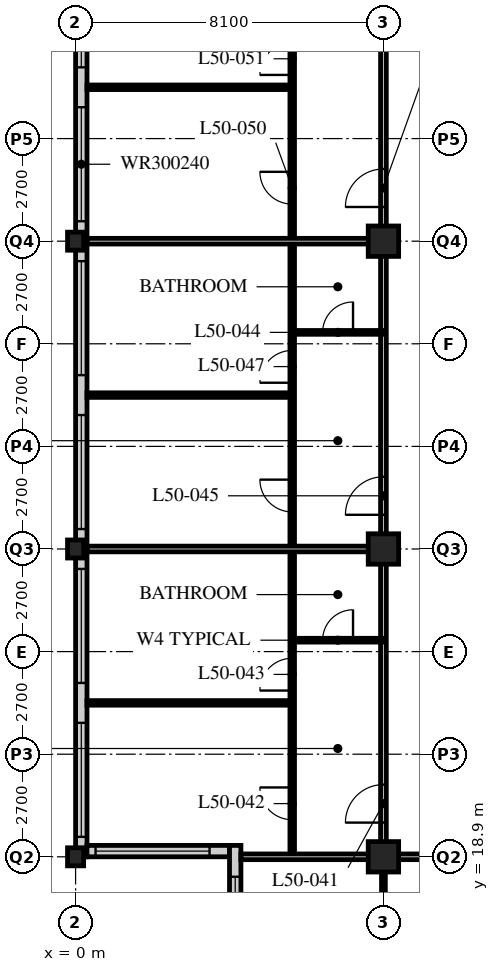
"""IFC4 building model, lengths in metres.
Left out: names, types, materials, properties, quantities, classifications, styles, units other than length and angle.
Written with IfcOpenShell. Run it as: python <this file> out.ifc"""

import sys

from ifc_helpers import new_model, si_unit, direction, frame, frame_2d, origin, origin_2d, place, context, subcontext, project, spatial, rectangle, hollow_rectangle, i_section, extrude, element, fill, save


model = new_model("IFC4")
c1 = context("Model", 3, precision=1e-05, world=origin(), true_north=direction((0.0, 1.0)))
c2 = subcontext(c1, "Body", "Model", "MODEL_VIEW")
j1 = project(units=[si_unit("LENGTHUNIT", "METRE"), si_unit("PLANEANGLEUNIT", "RADIAN")], contexts=[c1])
p1 = place(None, origin())
s1 = spatial("IfcSite", under=j1, at=p1, CompositionType="ELEMENT")
p2 = place(p1, origin())
s2 = spatial("IfcBuilding", under=s1, at=p2, CompositionType="ELEMENT")
p3 = place(p2, frame((0.0, 0.0, 195.6)))
s3 = spatial("IfcBuildingStorey", under=s2, at=p3, CompositionType="ELEMENT", Elevation=195.6)
for number, where, z_axis, x_axis in (
    (1, (0.0, 18.9, 0.0), (0.0, 0.0, 1.0), (1.0, 0.0, 0.0)),
    (2, (0.0, 27.0, 0.0), (0.0, 0.0, 1.0), (1.0, 0.0, 0.0)),
    (3, (0.0, 35.1, 0.0), (0.0, 0.0, 1.0), (1.0, 0.0, 0.0)),
):
    element("IfcColumn", number, at=place(p3, frame(where, z_axis=z_axis, x_axis=x_axis)), inside=s3, PredefinedType="COLUMN", context=c2, shape_type="SweptSolid", body=[
        extrude(i_section(OverallWidth=0.424, OverallDepth=0.475, WebThickness=0.048, FlangeThickness=0.077, FilletRadius=0.015, at=origin_2d()), origin(), (0.0, 0.0, 1.0), 3.6),
    ])
for number, where, z_axis, x_axis in (
    (4, (8.1, 18.9, 0.0), (0.0, 0.0, 1.0), (1.0, 0.0, 0.0)),
    (5, (8.1, 27.0, 0.0), (0.0, 0.0, 1.0), (1.0, 0.0, 0.0)),
    (6, (8.1, 35.1, 0.0), (0.0, 0.0, 1.0), (1.0, 0.0, 0.0)),
):
    element("IfcColumn", number, at=place(p3, frame(where, z_axis=z_axis, x_axis=x_axis)), inside=s3, PredefinedType="COLUMN", context=c2, shape_type="SweptSolid", body=[
        extrude(hollow_rectangle(XDim=0.8, YDim=0.8, WallThickness=0.08, at=origin_2d()), origin(), (0.0, 0.0, 1.0), 3.6),
    ])
p4 = place(p3, frame((0.15, 51.0, 0.0), z_axis=(0.0, 0.0, 1.0), x_axis=(0.0, -1.0, 0.0)))
e7 = element("IfcWall", 7, at=p4, inside=s3, PredefinedType="SOLIDWALL", context=c2, shape_type="SweptSolid", body=[
    extrude(rectangle(XDim=32.1, YDim=0.3, at=frame_2d((16.05, 0.0))), origin(), (0.0, 0.0, 1.0), 3.39),
])
p5 = place(p4, frame((0.225, 0.0, 0.6)))
e8 = element("IfcOpeningElement", 8, at=p5, cuts=e7, PredefinedType="OPENING", context=c2, shape_type="SweptSolid", body=[
    extrude(rectangle(XDim=3.0, YDim=2.4, at=frame_2d((1.5, 1.2))), frame((0.0, 0.16, 0.0), z_axis=(0.0, -1.0, 0.0), x_axis=(1.0, 0.0, 0.0)), (0.0, 0.0, 1.0), 0.32),
])
p6 = place(p4, frame((4.275, 0.0, 0.6)))
e9 = element("IfcOpeningElement", 9, at=p6, cuts=e7, PredefinedType="OPENING", context=c2, shape_type="SweptSolid", body=[
    extrude(rectangle(XDim=3.0, YDim=2.4, at=frame_2d((1.5, 1.2))), frame((0.0, 0.16, 0.0), z_axis=(0.0, -1.0, 0.0), x_axis=(1.0, 0.0, 0.0)), (0.0, 0.0, 1.0), 0.32),
])
p7 = place(p4, frame((8.325, 0.0, 0.6)))
e10 = element("IfcOpeningElement", 10, at=p7, cuts=e7, PredefinedType="OPENING", context=c2, shape_type="SweptSolid", body=[
    extrude(rectangle(XDim=3.0, YDim=2.4, at=frame_2d((1.5, 1.2))), frame((0.0, 0.16, 0.0), z_axis=(0.0, -1.0, 0.0), x_axis=(1.0, 0.0, 0.0)), (0.0, 0.0, 1.0), 0.32),
])
p8 = place(p4, frame((12.375, 0.0, 0.6)))
e11 = element("IfcOpeningElement", 11, at=p8, cuts=e7, PredefinedType="OPENING", context=c2, shape_type="SweptSolid", body=[
    extrude(rectangle(XDim=3.0, YDim=2.4, at=frame_2d((1.5, 1.2))), frame((0.0, 0.16, 0.0), z_axis=(0.0, -1.0, 0.0), x_axis=(1.0, 0.0, 0.0)), (0.0, 0.0, 1.0), 0.32),
])
p9 = place(p4, frame((16.425, 0.0, 0.6)))
e12 = element("IfcOpeningElement", 12, at=p9, cuts=e7, PredefinedType="OPENING", context=c2, shape_type="SweptSolid", body=[
    extrude(rectangle(XDim=3.0, YDim=2.4, at=frame_2d((1.5, 1.2))), frame((0.0, 0.16, 0.0), z_axis=(0.0, -1.0, 0.0), x_axis=(1.0, 0.0, 0.0)), (0.0, 0.0, 1.0), 0.32),
])
p10 = place(p4, frame((20.475, 0.0, 0.6)))
e13 = element("IfcOpeningElement", 13, at=p10, cuts=e7, PredefinedType="OPENING", context=c2, shape_type="SweptSolid", body=[
    extrude(rectangle(XDim=3.0, YDim=2.4, at=frame_2d((1.5, 1.2))), frame((0.0, 0.16, 0.0), z_axis=(0.0, -1.0, 0.0), x_axis=(1.0, 0.0, 0.0)), (0.0, 0.0, 1.0), 0.32),
])
p11 = place(p4, frame((24.525, 0.0, 0.6)))
e14 = element("IfcOpeningElement", 14, at=p11, cuts=e7, PredefinedType="OPENING", context=c2, shape_type="SweptSolid", body=[
    extrude(rectangle(XDim=3.0, YDim=2.4, at=frame_2d((1.5, 1.2))), frame((0.0, 0.16, 0.0), z_axis=(0.0, -1.0, 0.0), x_axis=(1.0, 0.0, 0.0)), (0.0, 0.0, 1.0), 0.32),
])
p12 = place(p4, frame((28.575, 0.0, 0.6)))
e15 = element("IfcOpeningElement", 15, at=p12, cuts=e7, PredefinedType="OPENING", context=c2, shape_type="SweptSolid", body=[
    extrude(rectangle(XDim=3.0, YDim=2.4, at=frame_2d((1.5, 1.2))), frame((0.0, 0.16, 0.0), z_axis=(0.0, -1.0, 0.0), x_axis=(1.0, 0.0, 0.0)), (0.0, 0.0, 1.0), 0.32),
])
p13 = place(p3, frame((0.3, 19.05, 0.0), z_axis=(0.0, 0.0, 1.0), x_axis=(1.0, 0.0, 0.0)))
e16 = element("IfcWall", 16, at=p13, inside=s3, PredefinedType="SOLIDWALL", context=c2, shape_type="SweptSolid", body=[
    extrude(rectangle(XDim=3.75, YDim=0.3, at=frame_2d((1.875, 0.0))), origin(), (0.0, 0.0, 1.0), 3.39),
])
p14 = place(p13, frame((0.225, 0.0, 0.6)))
e17 = element("IfcOpeningElement", 17, at=p14, cuts=e16, PredefinedType="OPENING", context=c2, shape_type="SweptSolid", body=[
    extrude(rectangle(XDim=3.0, YDim=2.0, at=frame_2d((1.5, 1.0))), frame((0.0, 0.16, 0.0), z_axis=(0.0, -1.0, 0.0), x_axis=(1.0, 0.0, 0.0)), (0.0, 0.0, 1.0), 0.32),
])
p15 = place(p3, frame((4.2, 19.2, 0.0), z_axis=(0.0, 0.0, 1.0), x_axis=(0.0, -1.0, 0.0)))
e18 = element("IfcWall", 18, at=p15, inside=s3, PredefinedType="SOLIDWALL", context=c2, shape_type="SweptSolid", body=[
    extrude(rectangle(XDim=4.35, YDim=0.3, at=frame_2d((2.175, 0.0))), origin(), (0.0, 0.0, 1.0), 3.39),
])
p16 = place(p15, frame((0.825, 0.0, 0.6)))
e19 = element("IfcOpeningElement", 19, at=p16, cuts=e18, PredefinedType="OPENING", context=c2, shape_type="SweptSolid", body=[
    extrude(rectangle(XDim=3.0, YDim=2.0, at=frame_2d((1.5, 1.0))), frame((0.0, 0.16, 0.0), z_axis=(0.0, -1.0, 0.0), x_axis=(1.0, 0.0, 0.0)), (0.0, 0.0, 1.0), 0.32),
])
p17 = place(p3, frame((8.1, 18.9, 0.0), z_axis=(0.0, 0.0, 1.0), x_axis=(1.0, 0.0, 0.0)))
e20 = element("IfcWall", 20, at=p17, inside=s3, PredefinedType="PARTITIONING", context=c2, shape_type="SweptSolid", body=[
    extrude(rectangle(XDim=40.5, YDim=0.15, at=frame_2d((20.25, 0.0))), origin(), (0.0, 0.0, 1.0), 2.778),
])
p18 = place(p17, frame((4.45, 0.0, 0.0)))
e21 = element("IfcOpeningElement", 21, at=p18, cuts=e20, PredefinedType="OPENING", context=c2, shape_type="SweptSolid", body=[
    extrude(rectangle(XDim=1.0, YDim=2.1, at=frame_2d((0.5, 1.05))), frame((0.0, 0.085, 0.0), z_axis=(0.0, -1.0, 0.0), x_axis=(1.0, 0.0, 0.0)), (0.0, 0.0, 1.0), 0.17),
])
p19 = place(p17, frame((17.1, 0.0, 0.0)))
e22 = element("IfcOpeningElement", 22, at=p19, cuts=e20, PredefinedType="OPENING", context=c2, shape_type="SweptSolid", body=[
    extrude(rectangle(XDim=1.0, YDim=2.1, at=frame_2d((0.5, 1.05))), frame((0.0, 0.085, 0.0), z_axis=(0.0, -1.0, 0.0), x_axis=(1.0, 0.0, 0.0)), (0.0, 0.0, 1.0), 0.17),
])
p20 = place(p17, frame((28.75, 0.0, 0.0)))
e23 = element("IfcOpeningElement", 23, at=p20, cuts=e20, PredefinedType="OPENING", context=c2, shape_type="SweptSolid", body=[
    extrude(rectangle(XDim=1.0, YDim=2.1, at=frame_2d((0.5, 1.05))), frame((0.0, 0.085, 0.0), z_axis=(0.0, -1.0, 0.0), x_axis=(1.0, 0.0, 0.0)), (0.0, 0.0, 1.0), 0.17),
])
p21 = place(p17, frame((2.625, 0.0, 0.0)))
e24 = element("IfcOpeningElement", 24, at=p21, cuts=e20, PredefinedType="OPENING", context=c2, shape_type="SweptSolid", body=[
    extrude(rectangle(XDim=1.0, YDim=2.1, at=frame_2d((0.5, 1.05))), frame((0.0, 0.085, 0.0), z_axis=(0.0, -1.0, 0.0), x_axis=(1.0, 0.0, 0.0)), (0.0, 0.0, 1.0), 0.17),
])
p22 = place(p17, frame((36.875, 0.0, 0.0)))
e25 = element("IfcOpeningElement", 25, at=p22, cuts=e20, PredefinedType="OPENING", context=c2, shape_type="SweptSolid", body=[
    extrude(rectangle(XDim=1.0, YDim=2.1, at=frame_2d((0.5, 1.05))), frame((0.0, 0.085, 0.0), z_axis=(0.0, -1.0, 0.0), x_axis=(1.0, 0.0, 0.0)), (0.0, 0.0, 1.0), 0.17),
])
p23 = place(p3, frame((8.1, 18.9, 0.0), z_axis=(0.0, 0.0, 1.0), x_axis=(0.0, 1.0, 0.0)))
e26 = element("IfcWall", 26, at=p23, inside=s3, PredefinedType="PARTITIONING", context=c2, shape_type="SweptSolid", body=[
    extrude(rectangle(XDim=24.3, YDim=0.15, at=frame_2d((12.15, 0.0))), origin(), (0.0, 0.0, 1.0), 2.778),
])
p24 = place(p23, frame((0.9, 0.0, 0.0)))
e27 = element("IfcOpeningElement", 27, at=p24, cuts=e26, PredefinedType="OPENING", context=c2, shape_type="SweptSolid", body=[
    extrude(rectangle(XDim=1.0, YDim=2.1, at=frame_2d((0.5, 1.05))), frame((0.0, 0.085, 0.0), z_axis=(0.0, -1.0, 0.0), x_axis=(1.0, 0.0, 0.0)), (0.0, 0.0, 1.0), 0.17),
])
p25 = place(p23, frame((9.0, 0.0, 0.0)))
e28 = element("IfcOpeningElement", 28, at=p25, cuts=e26, PredefinedType="OPENING", context=c2, shape_type="SweptSolid", body=[
    extrude(rectangle(XDim=1.0, YDim=2.1, at=frame_2d((0.5, 1.05))), frame((0.0, 0.085, 0.0), z_axis=(0.0, -1.0, 0.0), x_axis=(1.0, 0.0, 0.0)), (0.0, 0.0, 1.0), 0.17),
])
p26 = place(p23, frame((17.1, 0.0, 0.0)))
e29 = element("IfcOpeningElement", 29, at=p26, cuts=e26, PredefinedType="OPENING", context=c2, shape_type="SweptSolid", body=[
    extrude(rectangle(XDim=1.0, YDim=2.1, at=frame_2d((0.5, 1.05))), frame((0.0, 0.085, 0.0), z_axis=(0.0, -1.0, 0.0), x_axis=(1.0, 0.0, 0.0)), (0.0, 0.0, 1.0), 0.17),
])
p27 = place(p3, frame((5.7, 18.9, 0.0), z_axis=(0.0, 0.0, 1.0), x_axis=(0.0, 1.0, 0.0)))
e30 = element("IfcWall", 30, at=p27, inside=s3, PredefinedType="PARTITIONING", context=c2, shape_type="SweptSolid", body=[
    extrude(rectangle(XDim=24.3, YDim=0.12, at=frame_2d((12.15, 0.0))), origin(), (0.0, 0.0, 1.0), 3.39),
])
p28 = place(p27, frame((0.975, 0.0, 0.0)))
e31 = element("IfcOpeningElement", 31, at=p28, cuts=e30, PredefinedType="OPENING", context=c2, shape_type="SweptSolid", body=[
    extrude(rectangle(XDim=0.85, YDim=2.1, at=frame_2d((0.425, 1.05))), frame((0.0, 0.07, 0.0), z_axis=(0.0, -1.0, 0.0), x_axis=(1.0, 0.0, 0.0)), (0.0, 0.0, 1.0), 0.14),
])
p29 = place(p27, frame((4.375, 0.0, 0.0)))
e32 = element("IfcOpeningElement", 32, at=p29, cuts=e30, PredefinedType="OPENING", context=c2, shape_type="SweptSolid", body=[
    extrude(rectangle(XDim=0.85, YDim=2.1, at=frame_2d((0.425, 1.05))), frame((0.0, 0.07, 0.0), z_axis=(0.0, -1.0, 0.0), x_axis=(1.0, 0.0, 0.0)), (0.0, 0.0, 1.0), 0.14),
])
p30 = place(p27, frame((9.075, 0.0, 0.0)))
e33 = element("IfcOpeningElement", 33, at=p30, cuts=e30, PredefinedType="OPENING", context=c2, shape_type="SweptSolid", body=[
    extrude(rectangle(XDim=0.85, YDim=2.1, at=frame_2d((0.425, 1.05))), frame((0.0, 0.07, 0.0), z_axis=(0.0, -1.0, 0.0), x_axis=(1.0, 0.0, 0.0)), (0.0, 0.0, 1.0), 0.14),
])
p31 = place(p27, frame((12.475, 0.0, 0.0)))
e34 = element("IfcOpeningElement", 34, at=p31, cuts=e30, PredefinedType="OPENING", context=c2, shape_type="SweptSolid", body=[
    extrude(rectangle(XDim=0.85, YDim=2.1, at=frame_2d((0.425, 1.05))), frame((0.0, 0.07, 0.0), z_axis=(0.0, -1.0, 0.0), x_axis=(1.0, 0.0, 0.0)), (0.0, 0.0, 1.0), 0.14),
])
p32 = place(p27, frame((17.175, 0.0, 0.0)))
e35 = element("IfcOpeningElement", 35, at=p32, cuts=e30, PredefinedType="OPENING", context=c2, shape_type="SweptSolid", body=[
    extrude(rectangle(XDim=0.85, YDim=2.1, at=frame_2d((0.425, 1.05))), frame((0.0, 0.07, 0.0), z_axis=(0.0, -1.0, 0.0), x_axis=(1.0, 0.0, 0.0)), (0.0, 0.0, 1.0), 0.14),
])
p33 = place(p27, frame((20.575, 0.0, 0.0)))
e36 = element("IfcOpeningElement", 36, at=p33, cuts=e30, PredefinedType="OPENING", context=c2, shape_type="SweptSolid", body=[
    extrude(rectangle(XDim=0.85, YDim=2.1, at=frame_2d((0.425, 1.05))), frame((0.0, 0.07, 0.0), z_axis=(0.0, -1.0, 0.0), x_axis=(1.0, 0.0, 0.0)), (0.0, 0.0, 1.0), 0.14),
])
p34 = place(p3, frame((8.1, 24.6, 0.0), z_axis=(0.0, 0.0, 1.0), x_axis=(-1.0, 0.0, 0.0)))
e37 = element("IfcWall", 37, at=p34, inside=s3, PredefinedType="PARTITIONING", context=c2, shape_type="SweptSolid", body=[
    extrude(rectangle(XDim=2.4, YDim=0.1, at=frame_2d((1.2, 0.0))), origin(), (0.0, 0.0, 1.0), 3.39),
])
p35 = place(p34, frame((0.8, 0.0, 0.0)))
e38 = element("IfcOpeningElement", 38, at=p35, cuts=e37, PredefinedType="OPENING", context=c2, shape_type="SweptSolid", body=[
    extrude(rectangle(XDim=0.8, YDim=2.1, at=frame_2d((0.4, 1.05))), frame((0.0, 0.06, 0.0), z_axis=(0.0, -1.0, 0.0), x_axis=(1.0, 0.0, 0.0)), (0.0, 0.0, 1.0), 0.12),
])
p36 = place(p3, frame((5.7, 22.95, 0.0), z_axis=(0.0, 0.0, 1.0), x_axis=(-1.0, 0.0, 0.0)))
e39 = element("IfcWall", 39, at=p36, inside=s3, PredefinedType="PARTITIONING", context=c2, shape_type="SweptSolid", body=[
    extrude(rectangle(XDim=5.4, YDim=0.12, at=frame_2d((2.7, 0.0))), origin(), (0.0, 0.0, 1.0), 3.39),
])
p37 = place(p3, frame((8.1, 27.0, 0.0), z_axis=(0.0, 0.0, 1.0), x_axis=(-1.0, 0.0, 0.0)))
e40 = element("IfcWall", 40, at=p37, inside=s3, PredefinedType="PARTITIONING", context=c2, shape_type="SweptSolid", body=[
    extrude(rectangle(XDim=7.8, YDim=0.15, at=frame_2d((3.9, 0.0))), origin(), (0.0, 0.0, 1.0), 2.778),
])
p38 = place(p3, frame((8.1, 32.7, 0.0), z_axis=(0.0, 0.0, 1.0), x_axis=(-1.0, 0.0, 0.0)))
e41 = element("IfcWall", 41, at=p38, inside=s3, PredefinedType="PARTITIONING", context=c2, shape_type="SweptSolid", body=[
    extrude(rectangle(XDim=2.4, YDim=0.1, at=frame_2d((1.2, 0.0))), origin(), (0.0, 0.0, 1.0), 3.39),
])
p39 = place(p38, frame((0.8, 0.0, 0.0)))
e42 = element("IfcOpeningElement", 42, at=p39, cuts=e41, PredefinedType="OPENING", context=c2, shape_type="SweptSolid", body=[
    extrude(rectangle(XDim=0.8, YDim=2.1, at=frame_2d((0.4, 1.05))), frame((0.0, 0.06, 0.0), z_axis=(0.0, -1.0, 0.0), x_axis=(1.0, 0.0, 0.0)), (0.0, 0.0, 1.0), 0.12),
])
p40 = place(p3, frame((5.7, 31.05, 0.0), z_axis=(0.0, 0.0, 1.0), x_axis=(-1.0, 0.0, 0.0)))
e43 = element("IfcWall", 43, at=p40, inside=s3, PredefinedType="PARTITIONING", context=c2, shape_type="SweptSolid", body=[
    extrude(rectangle(XDim=5.4, YDim=0.12, at=frame_2d((2.7, 0.0))), origin(), (0.0, 0.0, 1.0), 3.39),
])
p41 = place(p3, frame((8.1, 35.1, 0.0), z_axis=(0.0, 0.0, 1.0), x_axis=(-1.0, 0.0, 0.0)))
e44 = element("IfcWall", 44, at=p41, inside=s3, PredefinedType="PARTITIONING", context=c2, shape_type="SweptSolid", body=[
    extrude(rectangle(XDim=7.8, YDim=0.15, at=frame_2d((3.9, 0.0))), origin(), (0.0, 0.0, 1.0), 2.778),
])
p42 = place(p3, frame((5.7, 39.15, 0.0), z_axis=(0.0, 0.0, 1.0), x_axis=(-1.0, 0.0, 0.0)))
e45 = element("IfcWall", 45, at=p42, inside=s3, PredefinedType="PARTITIONING", context=c2, shape_type="SweptSolid", body=[
    extrude(rectangle(XDim=5.4, YDim=0.12, at=frame_2d((2.7, 0.0))), origin(), (0.0, 0.0, 1.0), 3.39),
])
p43 = place(p3, frame((8.1, 18.9, 0.0), z_axis=(0.0, 0.0, 1.0), x_axis=(0.0, -1.0, 0.0)))
e46 = element("IfcWall", 46, at=p43, inside=s3, PredefinedType="PARTITIONING", context=c2, shape_type="SweptSolid", body=[
    extrude(rectangle(XDim=2.4, YDim=0.1, at=frame_2d((1.2, 0.0))), origin(), (0.0, 0.0, 1.0), 2.778),
])
p44 = place(p3, frame((4.35, 18.9, 0.0), z_axis=(0.0, 0.0, 1.0), x_axis=(1.0, 0.0, 0.0)))
e47 = element("IfcWall", 47, at=p44, inside=s3, PredefinedType="PARTITIONING", context=c2, shape_type="SweptSolid", body=[
    extrude(rectangle(XDim=3.75, YDim=0.15, at=frame_2d((1.875, 0.0))), origin(), (0.0, 0.0, 1.0), 2.778),
])
p45 = place(p7, origin())
e48 = element("IfcWindow", 48, at=p45, inside=s3, PartitioningType="SINGLE_PANEL", PredefinedType="WINDOW", context=c2, shape_type="SweptSolid", body=[
    extrude(rectangle(XDim=3.0, YDim=2.4, at=frame_2d((1.5, 1.2))), frame((0.0, 0.03, 0.0), z_axis=(0.0, -1.0, 0.0), x_axis=(1.0, 0.0, 0.0)), (0.0, 0.0, 1.0), 0.06),
])
fill(e10, e48)
p46 = place(p8, origin())
e49 = element("IfcWindow", 49, at=p46, inside=s3, PartitioningType="SINGLE_PANEL", PredefinedType="WINDOW", context=c2, shape_type="SweptSolid", body=[
    extrude(rectangle(XDim=3.0, YDim=2.4, at=frame_2d((1.5, 1.2))), frame((0.0, 0.03, 0.0), z_axis=(0.0, -1.0, 0.0), x_axis=(1.0, 0.0, 0.0)), (0.0, 0.0, 1.0), 0.06),
])
fill(e11, e49)
p47 = place(p9, origin())
e50 = element("IfcWindow", 50, at=p47, inside=s3, PartitioningType="SINGLE_PANEL", PredefinedType="WINDOW", context=c2, shape_type="SweptSolid", body=[
    extrude(rectangle(XDim=3.0, YDim=2.4, at=frame_2d((1.5, 1.2))), frame((0.0, 0.03, 0.0), z_axis=(0.0, -1.0, 0.0), x_axis=(1.0, 0.0, 0.0)), (0.0, 0.0, 1.0), 0.06),
])
fill(e12, e50)
p48 = place(p10, origin())
e51 = element("IfcWindow", 51, at=p48, inside=s3, PartitioningType="SINGLE_PANEL", PredefinedType="WINDOW", context=c2, shape_type="SweptSolid", body=[
    extrude(rectangle(XDim=3.0, YDim=2.4, at=frame_2d((1.5, 1.2))), frame((0.0, 0.03, 0.0), z_axis=(0.0, -1.0, 0.0), x_axis=(1.0, 0.0, 0.0)), (0.0, 0.0, 1.0), 0.06),
])
fill(e13, e51)
p49 = place(p11, origin())
e52 = element("IfcWindow", 52, at=p49, inside=s3, PartitioningType="SINGLE_PANEL", PredefinedType="WINDOW", context=c2, shape_type="SweptSolid", body=[
    extrude(rectangle(XDim=3.0, YDim=2.4, at=frame_2d((1.5, 1.2))), frame((0.0, 0.03, 0.0), z_axis=(0.0, -1.0, 0.0), x_axis=(1.0, 0.0, 0.0)), (0.0, 0.0, 1.0), 0.06),
])
fill(e14, e52)
p50 = place(p12, origin())
e53 = element("IfcWindow", 53, at=p50, inside=s3, PartitioningType="SINGLE_PANEL", PredefinedType="WINDOW", context=c2, shape_type="SweptSolid", body=[
    extrude(rectangle(XDim=3.0, YDim=2.4, at=frame_2d((1.5, 1.2))), frame((0.0, 0.03, 0.0), z_axis=(0.0, -1.0, 0.0), x_axis=(1.0, 0.0, 0.0)), (0.0, 0.0, 1.0), 0.06),
])
fill(e15, e53)
p51 = place(p14, origin())
e54 = element("IfcWindow", 54, at=p51, inside=s3, PartitioningType="SINGLE_PANEL", PredefinedType="WINDOW", context=c2, shape_type="SweptSolid", body=[
    extrude(rectangle(XDim=3.0, YDim=2.0, at=frame_2d((1.5, 1.0))), frame((0.0, 0.03, 0.0), z_axis=(0.0, -1.0, 0.0), x_axis=(1.0, 0.0, 0.0)), (0.0, 0.0, 1.0), 0.06),
])
fill(e17, e54)
p52 = place(p16, origin())
e55 = element("IfcWindow", 55, at=p52, inside=s3, PartitioningType="SINGLE_PANEL", PredefinedType="WINDOW", context=c2, shape_type="SweptSolid", body=[
    extrude(rectangle(XDim=3.0, YDim=2.0, at=frame_2d((1.5, 1.0))), frame((0.0, 0.03, 0.0), z_axis=(0.0, -1.0, 0.0), x_axis=(1.0, 0.0, 0.0)), (0.0, 0.0, 1.0), 0.06),
])
fill(e19, e55)
p53 = place(p35, origin())
e56 = element("IfcDoor", 56, at=p53, inside=s3, OperationType="SINGLE_SWING_RIGHT", PredefinedType="DOOR", context=c2, shape_type="SweptSolid", body=[
    extrude(rectangle(XDim=0.8, YDim=2.1, at=frame_2d((0.4, 1.05))), frame((0.0, 0.025, 0.0), z_axis=(0.0, -1.0, 0.0), x_axis=(1.0, 0.0, 0.0)), (0.0, 0.0, 1.0), 0.05),
])
fill(e38, e56)
p54 = place(p24, origin())
e57 = element("IfcDoor", 57, at=p54, inside=s3, OperationType="SINGLE_SWING_LEFT", PredefinedType="DOOR", context=c2, shape_type="SweptSolid", body=[
    extrude(rectangle(XDim=1.0, YDim=2.1, at=frame_2d((0.5, 1.05))), frame((0.0, 0.025, 0.0), z_axis=(0.0, -1.0, 0.0), x_axis=(1.0, 0.0, 0.0)), (0.0, 0.0, 1.0), 0.05),
])
fill(e27, e57)
p55 = place(p28, origin())
e58 = element("IfcDoor", 58, at=p55, inside=s3, OperationType="SINGLE_SWING_RIGHT", PredefinedType="DOOR", context=c2, shape_type="SweptSolid", body=[
    extrude(rectangle(XDim=0.85, YDim=2.1, at=frame_2d((0.425, 1.05))), frame((0.0, 0.025, 0.0), z_axis=(0.0, -1.0, 0.0), x_axis=(1.0, 0.0, 0.0)), (0.0, 0.0, 1.0), 0.05),
])
fill(e31, e58)
p56 = place(p29, origin())
e59 = element("IfcDoor", 59, at=p56, inside=s3, OperationType="SINGLE_SWING_LEFT", PredefinedType="DOOR", context=c2, shape_type="SweptSolid", body=[
    extrude(rectangle(XDim=0.85, YDim=2.1, at=frame_2d((0.425, 1.05))), frame((0.0, 0.025, 0.0), z_axis=(0.0, -1.0, 0.0), x_axis=(1.0, 0.0, 0.0)), (0.0, 0.0, 1.0), 0.05),
])
fill(e32, e59)
p57 = place(p39, origin())
e60 = element("IfcDoor", 60, at=p57, inside=s3, OperationType="SINGLE_SWING_RIGHT", PredefinedType="DOOR", context=c2, shape_type="SweptSolid", body=[
    extrude(rectangle(XDim=0.8, YDim=2.1, at=frame_2d((0.4, 1.05))), frame((0.0, 0.025, 0.0), z_axis=(0.0, -1.0, 0.0), x_axis=(1.0, 0.0, 0.0)), (0.0, 0.0, 1.0), 0.05),
])
fill(e42, e60)
p58 = place(p25, origin())
e61 = element("IfcDoor", 61, at=p58, inside=s3, OperationType="SINGLE_SWING_LEFT", PredefinedType="DOOR", context=c2, shape_type="SweptSolid", body=[
    extrude(rectangle(XDim=1.0, YDim=2.1, at=frame_2d((0.5, 1.05))), frame((0.0, 0.025, 0.0), z_axis=(0.0, -1.0, 0.0), x_axis=(1.0, 0.0, 0.0)), (0.0, 0.0, 1.0), 0.05),
])
fill(e28, e61)
p59 = place(p30, origin())
e62 = element("IfcDoor", 62, at=p59, inside=s3, OperationType="SINGLE_SWING_RIGHT", PredefinedType="DOOR", context=c2, shape_type="SweptSolid", body=[
    extrude(rectangle(XDim=0.85, YDim=2.1, at=frame_2d((0.425, 1.05))), frame((0.0, 0.025, 0.0), z_axis=(0.0, -1.0, 0.0), x_axis=(1.0, 0.0, 0.0)), (0.0, 0.0, 1.0), 0.05),
])
fill(e33, e62)
p60 = place(p31, origin())
e63 = element("IfcDoor", 63, at=p60, inside=s3, OperationType="SINGLE_SWING_LEFT", PredefinedType="DOOR", context=c2, shape_type="SweptSolid", body=[
    extrude(rectangle(XDim=0.85, YDim=2.1, at=frame_2d((0.425, 1.05))), frame((0.0, 0.025, 0.0), z_axis=(0.0, -1.0, 0.0), x_axis=(1.0, 0.0, 0.0)), (0.0, 0.0, 1.0), 0.05),
])
fill(e34, e63)
p61 = place(p26, origin())
e64 = element("IfcDoor", 64, at=p61, inside=s3, OperationType="SINGLE_SWING_LEFT", PredefinedType="DOOR", context=c2, shape_type="SweptSolid", body=[
    extrude(rectangle(XDim=1.0, YDim=2.1, at=frame_2d((0.5, 1.05))), frame((0.0, 0.025, 0.0), z_axis=(0.0, -1.0, 0.0), x_axis=(1.0, 0.0, 0.0)), (0.0, 0.0, 1.0), 0.05),
])
fill(e29, e64)
p62 = place(p32, origin())
e65 = element("IfcDoor", 65, at=p62, inside=s3, OperationType="SINGLE_SWING_RIGHT", PredefinedType="DOOR", context=c2, shape_type="SweptSolid", body=[
    extrude(rectangle(XDim=0.85, YDim=2.1, at=frame_2d((0.425, 1.05))), frame((0.0, 0.025, 0.0), z_axis=(0.0, -1.0, 0.0), x_axis=(1.0, 0.0, 0.0)), (0.0, 0.0, 1.0), 0.05),
])
fill(e35, e65)
p63 = place(p33, origin())
e66 = element("IfcDoor", 66, at=p63, inside=s3, OperationType="SINGLE_SWING_LEFT", PredefinedType="DOOR", context=c2, shape_type="SweptSolid", body=[
    extrude(rectangle(XDim=0.85, YDim=2.1, at=frame_2d((0.425, 1.05))), frame((0.0, 0.025, 0.0), z_axis=(0.0, -1.0, 0.0), x_axis=(1.0, 0.0, 0.0)), (0.0, 0.0, 1.0), 0.05),
])
fill(e36, e66)
save(model, sys.argv[1])
